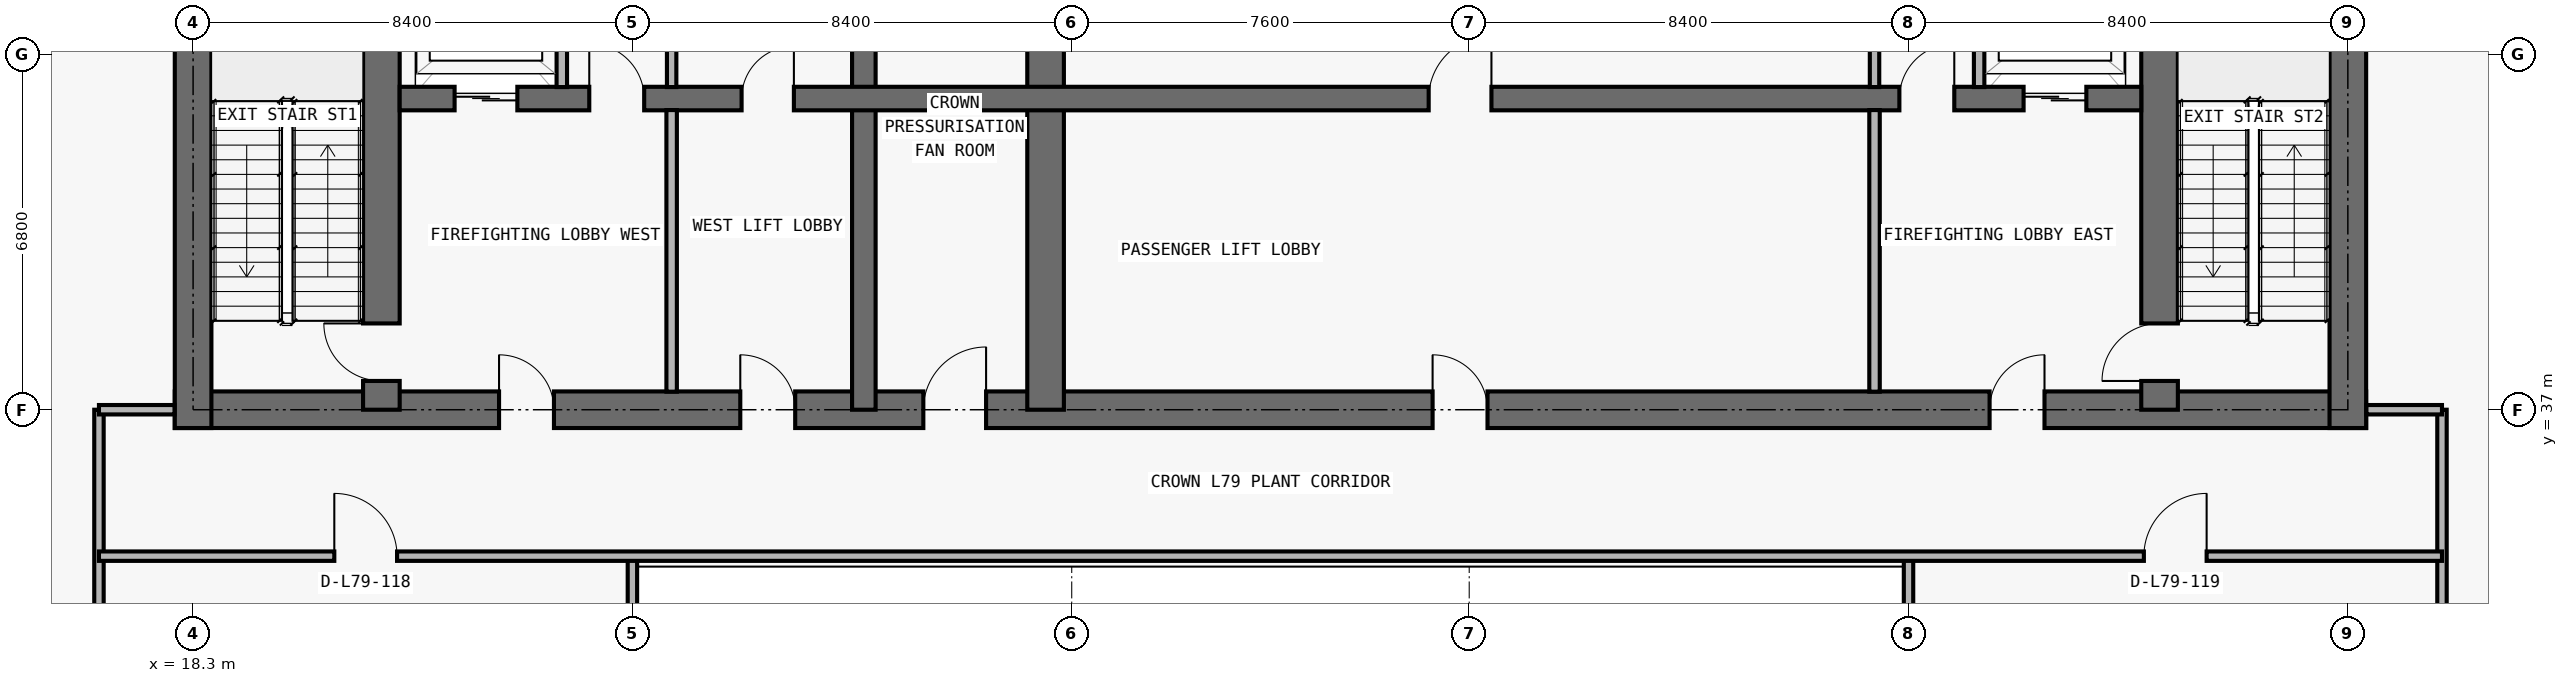
"""IFC4 building model, lengths in metres.
Left out: names, types, materials, properties, quantities, classifications, styles, units other than length and angle.
Written with IfcOpenShell. Run it as: python <this file> out.ifc"""

import sys

from ifc_helpers import new_model, si_unit, direction, frame, frame_2d, origin, place, context, subcontext, project, spatial, rectangle, extrude, element, fill, save


model = new_model("IFC4")
c1 = context("Model", 3, precision=1e-05, world=origin(), true_north=direction((0.0, 1.0)))
c2 = subcontext(c1, "Body", "Model", "MODEL_VIEW")
j1 = project(units=[si_unit("LENGTHUNIT", "METRE"), si_unit("PLANEANGLEUNIT", "RADIAN")], contexts=[c1])
p1 = place(None, origin())
s1 = spatial("IfcSite", under=j1, at=p1, CompositionType="ELEMENT")
p2 = place(p1, origin())
s2 = spatial("IfcBuilding", under=s1, at=p2, CompositionType="ELEMENT")
p3 = place(p2, frame((0.0, 0.0, 284.8)))
s3 = spatial("IfcBuildingStorey", under=s2, at=p3, CompositionType="ELEMENT", Elevation=284.8)
p4 = place(p3, frame((17.95, 37.0, 0.0), z_axis=(0.0, 0.0, 1.0), x_axis=(1.0, 0.0, 0.0)))
e1 = element("IfcWall", 1, at=p4, inside=s3, PredefinedType="SHEAR", context=c2, shape_type="SweptSolid", body=[
    extrude(rectangle(XDim=41.9, YDim=0.7, at=frame_2d((20.95, 0.0))), origin(), (0.0, 0.0, 1.0), 5.1),
])
p5 = place(p4, frame((14.312, 0.0, 0.0)))
e2 = element("IfcOpeningElement", 2, at=p5, cuts=e1, PredefinedType="OPENING", context=c2, shape_type="SweptSolid", body=[
    extrude(rectangle(XDim=1.2, YDim=2.2, at=frame_2d((0.6, 1.1))), frame((0.0, 0.36, 0.0), z_axis=(0.0, -1.0, 0.0), x_axis=(1.0, 0.0, 0.0)), (0.0, 0.0, 1.0), 0.72),
])
p6 = place(p4, frame((6.2, 0.0, 0.0)))
e3 = element("IfcOpeningElement", 3, at=p6, cuts=e1, PredefinedType="OPENING", context=c2, shape_type="SweptSolid", body=[
    extrude(rectangle(XDim=1.05, YDim=2.15, at=frame_2d((0.525, 1.075))), frame((0.0, 0.36, 0.0), z_axis=(0.0, -1.0, 0.0), x_axis=(1.0, 0.0, 0.0)), (0.0, 0.0, 1.0), 0.72),
])
p7 = place(p4, frame((34.7, 0.0, 0.0)))
e4 = element("IfcOpeningElement", 4, at=p7, cuts=e1, PredefinedType="OPENING", context=c2, shape_type="SweptSolid", body=[
    extrude(rectangle(XDim=1.05, YDim=2.15, at=frame_2d((0.525, 1.075))), frame((0.0, 0.36, 0.0), z_axis=(0.0, -1.0, 0.0), x_axis=(1.0, 0.0, 0.0)), (0.0, 0.0, 1.0), 0.72),
])
p8 = place(p4, frame((10.812, 0.0, 0.0)))
e5 = element("IfcOpeningElement", 5, at=p8, cuts=e1, PredefinedType="OPENING", context=c2, shape_type="SweptSolid", body=[
    extrude(rectangle(XDim=1.05, YDim=2.15, at=frame_2d((0.525, 1.075))), frame((0.0, 0.36, 0.0), z_axis=(0.0, -1.0, 0.0), x_axis=(1.0, 0.0, 0.0)), (0.0, 0.0, 1.0), 0.72),
])
p9 = place(p4, frame((24.05, 0.0, 0.0)))
e6 = element("IfcOpeningElement", 6, at=p9, cuts=e1, PredefinedType="OPENING", context=c2, shape_type="SweptSolid", body=[
    extrude(rectangle(XDim=1.05, YDim=2.15, at=frame_2d((0.525, 1.075))), frame((0.0, 0.36, 0.0), z_axis=(0.0, -1.0, 0.0), x_axis=(1.0, 0.0, 0.0)), (0.0, 0.0, 1.0), 0.72),
])
for number, where, z_axis, x_axis in (
    (7, (18.3, 36.65, 0.0), (0.0, 0.0, 1.0), (0.0, 1.0, 0.0)),
    (8, (59.5, 36.65, 0.0), (0.0, 0.0, 1.0), (0.0, 1.0, 0.0)),
):
    element("IfcWall", number, at=place(p3, frame(where, z_axis=z_axis, x_axis=x_axis)), inside=s3, PredefinedType="SHEAR", context=c2, shape_type="SweptSolid", body=[
        extrude(rectangle(XDim=13.95, YDim=0.7, at=frame_2d((6.975, 0.0))), origin(), (0.0, 0.0, 1.0), 5.1),
    ])
p10 = place(p3, frame((21.9, 37.0, 0.0), z_axis=(0.0, 0.0, 1.0), x_axis=(0.0, 1.0, 0.0)))
e9 = element("IfcWall", 9, at=p10, inside=s3, PredefinedType="SHEAR", context=c2, shape_type="SweptSolid", body=[
    extrude(rectangle(XDim=9.575, YDim=0.7, at=frame_2d((4.788, 0.0))), origin(), (0.0, 0.0, 1.0), 5.1),
])
p11 = place(p10, frame((0.55, 0.0, 0.0)))
e10 = element("IfcOpeningElement", 10, at=p11, cuts=e9, PredefinedType="OPENING", context=c2, shape_type="SweptSolid", body=[
    extrude(rectangle(XDim=1.1, YDim=2.15, at=frame_2d((0.55, 1.075))), frame((0.0, 0.36, 0.0), z_axis=(0.0, -1.0, 0.0), x_axis=(1.0, 0.0, 0.0)), (0.0, 0.0, 1.0), 0.72),
])
p12 = place(p3, frame((55.9, 37.0, 0.0), z_axis=(0.0, 0.0, 1.0), x_axis=(0.0, 1.0, 0.0)))
e11 = element("IfcWall", 11, at=p12, inside=s3, PredefinedType="SHEAR", context=c2, shape_type="SweptSolid", body=[
    extrude(rectangle(XDim=9.575, YDim=0.7, at=frame_2d((4.788, 0.0))), origin(), (0.0, 0.0, 1.0), 5.1),
])
p13 = place(p12, frame((0.55, 0.0, 0.0)))
e12 = element("IfcOpeningElement", 12, at=p13, cuts=e11, PredefinedType="OPENING", context=c2, shape_type="SweptSolid", body=[
    extrude(rectangle(XDim=1.1, YDim=2.15, at=frame_2d((0.55, 1.075))), frame((0.0, 0.36, 0.0), z_axis=(0.0, -1.0, 0.0), x_axis=(1.0, 0.0, 0.0)), (0.0, 0.0, 1.0), 0.72),
])
p14 = place(p3, frame((31.125, 37.0, 0.0), z_axis=(0.0, 0.0, 1.0), x_axis=(0.0, 1.0, 0.0)))
e13 = element("IfcWall", 13, at=p14, inside=s3, PredefinedType="SHEAR", context=c2, shape_type="SweptSolid", body=[
    extrude(rectangle(XDim=9.575, YDim=0.45, at=frame_2d((4.788, 0.0))), origin(), (0.0, 0.0, 1.0), 5.1),
])
p15 = place(p3, frame((34.6, 37.0, 0.0), z_axis=(0.0, 0.0, 1.0), x_axis=(0.0, 1.0, 0.0)))
e14 = element("IfcWall", 14, at=p15, inside=s3, PredefinedType="SHEAR", context=c2, shape_type="SweptSolid", body=[
    extrude(rectangle(XDim=9.575, YDim=0.7, at=frame_2d((4.788, 0.0))), origin(), (0.0, 0.0, 1.0), 5.1),
])
p16 = place(p3, frame((22.25, 42.95, 0.0), z_axis=(0.0, 0.0, 1.0), x_axis=(1.0, 0.0, 0.0)))
e15 = element("IfcWall", 15, at=p16, inside=s3, PredefinedType="SHEAR", context=c2, shape_type="SweptSolid", body=[
    extrude(rectangle(XDim=33.3, YDim=0.45, at=frame_2d((16.65, 0.0))), origin(), (0.0, 0.0, 1.0), 5.1),
])
p17 = place(p16, frame((1.05, 0.0, 0.0)))
e16 = element("IfcOpeningElement", 16, at=p17, cuts=e15, PredefinedType="OPENING", context=c2, shape_type="SweptSolid", body=[
    extrude(rectangle(XDim=1.2, YDim=2.2, at=frame_2d((0.6, 1.1))), frame((0.0, 0.235, 0.0), z_axis=(0.0, -1.0, 0.0), x_axis=(1.0, 0.0, 0.0)), (0.0, 0.0, 1.0), 0.47),
])
p18 = place(p16, frame((31.05, 0.0, 0.0)))
e17 = element("IfcOpeningElement", 17, at=p18, cuts=e15, PredefinedType="OPENING", context=c2, shape_type="SweptSolid", body=[
    extrude(rectangle(XDim=1.2, YDim=2.2, at=frame_2d((0.6, 1.1))), frame((0.0, 0.235, 0.0), z_axis=(0.0, -1.0, 0.0), x_axis=(1.0, 0.0, 0.0)), (0.0, 0.0, 1.0), 0.47),
])
p19 = place(p16, frame((3.625, 0.0, 0.0)))
e18 = element("IfcOpeningElement", 18, at=p19, cuts=e15, PredefinedType="OPENING", context=c2, shape_type="SweptSolid", body=[
    extrude(rectangle(XDim=1.05, YDim=2.15, at=frame_2d((0.525, 1.075))), frame((0.0, 0.235, 0.0), z_axis=(0.0, -1.0, 0.0), x_axis=(1.0, 0.0, 0.0)), (0.0, 0.0, 1.0), 0.47),
])
p20 = place(p16, frame((28.675, 0.0, 0.0)))
e19 = element("IfcOpeningElement", 19, at=p20, cuts=e15, PredefinedType="OPENING", context=c2, shape_type="SweptSolid", body=[
    extrude(rectangle(XDim=1.05, YDim=2.15, at=frame_2d((0.525, 1.075))), frame((0.0, 0.235, 0.0), z_axis=(0.0, -1.0, 0.0), x_axis=(1.0, 0.0, 0.0)), (0.0, 0.0, 1.0), 0.47),
])
p21 = place(p16, frame((6.538, 0.0, 0.0)))
e20 = element("IfcOpeningElement", 20, at=p21, cuts=e15, PredefinedType="OPENING", context=c2, shape_type="SweptSolid", body=[
    extrude(rectangle(XDim=1.0, YDim=2.2, at=frame_2d((0.5, 1.1))), frame((0.0, 0.235, 0.0), z_axis=(0.0, -1.0, 0.0), x_axis=(1.0, 0.0, 0.0)), (0.0, 0.0, 1.0), 0.47),
])
p22 = place(p16, frame((19.675, 0.0, 0.0)))
e21 = element("IfcOpeningElement", 21, at=p22, cuts=e15, PredefinedType="OPENING", context=c2, shape_type="SweptSolid", body=[
    extrude(rectangle(XDim=1.2, YDim=2.2, at=frame_2d((0.6, 1.1))), frame((0.0, 0.235, 0.0), z_axis=(0.0, -1.0, 0.0), x_axis=(1.0, 0.0, 0.0)), (0.0, 0.0, 1.0), 0.47),
])
p23 = place(p3, frame((16.5, 18.485, 0.0), z_axis=(0.0, 0.0, 1.0), x_axis=(0.0, 1.0, 0.0)))
e22 = element("IfcWall", 22, at=p23, inside=s3, PredefinedType="PARTITIONING", context=c2, shape_type="SweptSolid", body=[
    extrude(rectangle(XDim=18.515, YDim=0.18, at=frame_2d((9.257, 0.0))), origin(), (0.0, 0.0, 1.0), 5.1),
])
p24 = place(p3, frame((25.35, 43.17, 0.0), z_axis=(0.0, 0.0, 1.0), x_axis=(0.0, 1.0, 0.0)))
e23 = element("IfcWall", 23, at=p24, inside=s3, PredefinedType="PARTITIONING", context=c2, shape_type="SweptSolid", body=[
    extrude(rectangle(XDim=3.185, YDim=0.2, at=frame_2d((1.593, 0.0))), origin(), (0.0, 0.0, 1.0), 5.1),
])
p25 = place(p3, frame((26.7, 29.405, 0.0), z_axis=(0.0, 0.0, 1.0), x_axis=(0.0, 1.0, 0.0)))
e24 = element("IfcWall", 24, at=p25, inside=s3, PredefinedType="PARTITIONING", context=c2, shape_type="SweptSolid", body=[
    extrude(rectangle(XDim=4.795, YDim=0.18, at=frame_2d((2.397, 0.0))), origin(), (0.0, 0.0, 1.0), 4.385),
])
p26 = place(p3, frame((27.45, 37.345, 0.0), z_axis=(0.0, 0.0, 1.0), x_axis=(0.0, 1.0, 0.0)))
e25 = element("IfcWall", 25, at=p26, inside=s3, PredefinedType="PARTITIONING", context=c2, shape_type="SweptSolid", body=[
    extrude(rectangle(XDim=5.385, YDim=0.2, at=frame_2d((2.692, 0.0))), origin(), (0.0, 0.0, 1.0), 5.1),
])
p27 = place(p3, frame((27.45, 43.17, 0.0), z_axis=(0.0, 0.0, 1.0), x_axis=(0.0, 1.0, 0.0)))
e26 = element("IfcWall", 26, at=p27, inside=s3, PredefinedType="PARTITIONING", context=c2, shape_type="SweptSolid", body=[
    extrude(rectangle(XDim=3.185, YDim=0.18, at=frame_2d((1.593, 0.0))), origin(), (0.0, 0.0, 1.0), 5.1),
])
p28 = place(p3, frame((50.45, 37.345, 0.0), z_axis=(0.0, 0.0, 1.0), x_axis=(0.0, 1.0, 0.0)))
e27 = element("IfcWall", 27, at=p28, inside=s3, PredefinedType="PARTITIONING", context=c2, shape_type="SweptSolid", body=[
    extrude(rectangle(XDim=5.385, YDim=0.2, at=frame_2d((2.692, 0.0))), origin(), (0.0, 0.0, 1.0), 5.1),
])
p29 = place(p3, frame((50.45, 43.17, 0.0), z_axis=(0.0, 0.0, 1.0), x_axis=(0.0, 1.0, 0.0)))
e28 = element("IfcWall", 28, at=p29, inside=s3, PredefinedType="PARTITIONING", context=c2, shape_type="SweptSolid", body=[
    extrude(rectangle(XDim=3.185, YDim=0.18, at=frame_2d((1.593, 0.0))), origin(), (0.0, 0.0, 1.0), 5.1),
])
p30 = place(p3, frame((51.1, 29.405, 0.0), z_axis=(0.0, 0.0, 1.0), x_axis=(0.0, 1.0, 0.0)))
e29 = element("IfcWall", 29, at=p30, inside=s3, PredefinedType="PARTITIONING", context=c2, shape_type="SweptSolid", body=[
    extrude(rectangle(XDim=4.795, YDim=0.18, at=frame_2d((2.397, 0.0))), origin(), (0.0, 0.0, 1.0), 4.385),
])
p31 = place(p3, frame((52.45, 43.17, 0.0), z_axis=(0.0, 0.0, 1.0), x_axis=(0.0, 1.0, 0.0)))
e30 = element("IfcWall", 30, at=p31, inside=s3, PredefinedType="PARTITIONING", context=c2, shape_type="SweptSolid", body=[
    extrude(rectangle(XDim=3.185, YDim=0.2, at=frame_2d((1.593, 0.0))), origin(), (0.0, 0.0, 1.0), 5.1),
])
p32 = place(p3, frame((61.3, 18.52, 0.0), z_axis=(0.0, 0.0, 1.0), x_axis=(0.0, 1.0, 0.0)))
e31 = element("IfcWall", 31, at=p32, inside=s3, PredefinedType="PARTITIONING", context=c2, shape_type="SweptSolid", body=[
    extrude(rectangle(XDim=18.48, YDim=0.18, at=frame_2d((9.24, 0.0))), origin(), (0.0, 0.0, 1.0), 5.1),
])
p33 = place(p3, frame((16.5, 34.2, 0.0), z_axis=(0.0, 0.0, 1.0), x_axis=(1.0, 0.0, 0.0)))
e32 = element("IfcWall", 32, at=p33, inside=s3, PredefinedType="PARTITIONING", context=c2, shape_type="SweptSolid", body=[
    extrude(rectangle(XDim=44.8, YDim=0.18, at=frame_2d((22.4, 0.0))), origin(), (0.0, 0.0, 1.0), 5.1),
])
p34 = place(p33, frame((4.5, 0.0, 0.0)))
e33 = element("IfcOpeningElement", 33, at=p34, cuts=e32, PredefinedType="OPENING", context=c2, shape_type="SweptSolid", body=[
    extrude(rectangle(XDim=1.2, YDim=2.2, at=frame_2d((0.6, 1.1))), frame((0.0, 0.1, 0.0), z_axis=(0.0, -1.0, 0.0), x_axis=(1.0, 0.0, 0.0)), (0.0, 0.0, 1.0), 0.2),
])
p35 = place(p33, frame((39.1, 0.0, 0.0)))
e34 = element("IfcOpeningElement", 34, at=p35, cuts=e32, PredefinedType="OPENING", context=c2, shape_type="SweptSolid", body=[
    extrude(rectangle(XDim=1.2, YDim=2.2, at=frame_2d((0.6, 1.1))), frame((0.0, 0.1, 0.0), z_axis=(0.0, -1.0, 0.0), x_axis=(1.0, 0.0, 0.0)), (0.0, 0.0, 1.0), 0.2),
])
for number, where, z_axis, x_axis in (
    (35, (16.5, 37.0, 0.0), (0.0, 0.0, 1.0), (1.0, 0.0, 0.0)),
    (36, (59.855, 37.0, 0.0), (0.0, 0.0, 1.0), (1.0, 0.0, 0.0)),
):
    element("IfcWall", number, at=place(p3, frame(where, z_axis=z_axis, x_axis=x_axis)), inside=s3, PredefinedType="PARTITIONING", context=c2, shape_type="SweptSolid", body=[
        extrude(rectangle(XDim=1.445, YDim=0.18, at=frame_2d((0.723, 0.0))), origin(), (0.0, 0.0, 1.0), 5.1),
    ])
p36 = place(p17, origin())
e37 = element("IfcDoor", 37, at=p36, inside=s3, OperationType="DOUBLE_DOOR_SLIDING", PredefinedType="DOOR", context=c2, shape_type="SweptSolid", body=[
    extrude(rectangle(XDim=1.2, YDim=2.2, at=frame_2d((0.6, 1.1))), frame((0.0, 0.025, 0.0), z_axis=(0.0, -1.0, 0.0), x_axis=(1.0, 0.0, 0.0)), (0.0, 0.0, 1.0), 0.05),
])
fill(e16, e37)
p37 = place(p18, origin())
e38 = element("IfcDoor", 38, at=p37, inside=s3, OperationType="DOUBLE_DOOR_SLIDING", PredefinedType="DOOR", context=c2, shape_type="SweptSolid", body=[
    extrude(rectangle(XDim=1.2, YDim=2.2, at=frame_2d((0.6, 1.1))), frame((0.0, 0.025, 0.0), z_axis=(0.0, -1.0, 0.0), x_axis=(1.0, 0.0, 0.0)), (0.0, 0.0, 1.0), 0.05),
])
fill(e17, e38)
p38 = place(p5, origin())
e39 = element("IfcDoor", 39, at=p38, inside=s3, OperationType="SINGLE_SWING_RIGHT", PredefinedType="DOOR", context=c2, shape_type="SweptSolid", body=[
    extrude(rectangle(XDim=1.2, YDim=2.2, at=frame_2d((0.6, 1.1))), frame((0.0, 0.025, 0.0), z_axis=(0.0, -1.0, 0.0), x_axis=(1.0, 0.0, 0.0)), (0.0, 0.0, 1.0), 0.05),
])
fill(e2, e39)
p39 = place(p6, origin())
e40 = element("IfcDoor", 40, at=p39, inside=s3, OperationType="SINGLE_SWING_LEFT", PredefinedType="DOOR", context=c2, shape_type="SweptSolid", body=[
    extrude(rectangle(XDim=1.05, YDim=2.15, at=frame_2d((0.525, 1.075))), frame((0.0, 0.025, 0.0), z_axis=(0.0, -1.0, 0.0), x_axis=(1.0, 0.0, 0.0)), (0.0, 0.0, 1.0), 0.05),
])
fill(e3, e40)
p40 = place(p11, origin())
e41 = element("IfcDoor", 41, at=p40, inside=s3, OperationType="SINGLE_SWING_RIGHT", PredefinedType="DOOR", context=c2, shape_type="SweptSolid", body=[
    extrude(rectangle(XDim=1.1, YDim=2.15, at=frame_2d((0.55, 1.075))), frame((0.0, 0.025, 0.0), z_axis=(0.0, -1.0, 0.0), x_axis=(1.0, 0.0, 0.0)), (0.0, 0.0, 1.0), 0.05),
])
fill(e10, e41)
p41 = place(p19, origin())
e42 = element("IfcDoor", 42, at=p41, inside=s3, OperationType="SINGLE_SWING_LEFT", PredefinedType="DOOR", context=c2, shape_type="SweptSolid", body=[
    extrude(rectangle(XDim=1.05, YDim=2.15, at=frame_2d((0.525, 1.075))), frame((0.0, 0.025, 0.0), z_axis=(0.0, -1.0, 0.0), x_axis=(1.0, 0.0, 0.0)), (0.0, 0.0, 1.0), 0.05),
])
fill(e18, e42)
p42 = place(p7, origin())
e43 = element("IfcDoor", 43, at=p42, inside=s3, OperationType="SINGLE_SWING_RIGHT", PredefinedType="DOOR", context=c2, shape_type="SweptSolid", body=[
    extrude(rectangle(XDim=1.05, YDim=2.15, at=frame_2d((0.525, 1.075))), frame((0.0, 0.025, 0.0), z_axis=(0.0, -1.0, 0.0), x_axis=(1.0, 0.0, 0.0)), (0.0, 0.0, 1.0), 0.05),
])
fill(e4, e43)
p43 = place(p13, origin())
e44 = element("IfcDoor", 44, at=p43, inside=s3, OperationType="SINGLE_SWING_LEFT", PredefinedType="DOOR", context=c2, shape_type="SweptSolid", body=[
    extrude(rectangle(XDim=1.1, YDim=2.15, at=frame_2d((0.55, 1.075))), frame((0.0, 0.025, 0.0), z_axis=(0.0, -1.0, 0.0), x_axis=(1.0, 0.0, 0.0)), (0.0, 0.0, 1.0), 0.05),
])
fill(e12, e44)
p44 = place(p20, origin())
e45 = element("IfcDoor", 45, at=p44, inside=s3, OperationType="SINGLE_SWING_RIGHT", PredefinedType="DOOR", context=c2, shape_type="SweptSolid", body=[
    extrude(rectangle(XDim=1.05, YDim=2.15, at=frame_2d((0.525, 1.075))), frame((0.0, 0.025, 0.0), z_axis=(0.0, -1.0, 0.0), x_axis=(1.0, 0.0, 0.0)), (0.0, 0.0, 1.0), 0.05),
])
fill(e19, e45)
p45 = place(p8, origin())
e46 = element("IfcDoor", 46, at=p45, inside=s3, OperationType="SINGLE_SWING_LEFT", PredefinedType="DOOR", context=c2, shape_type="SweptSolid", body=[
    extrude(rectangle(XDim=1.05, YDim=2.15, at=frame_2d((0.525, 1.075))), frame((0.0, 0.025, 0.0), z_axis=(0.0, -1.0, 0.0), x_axis=(1.0, 0.0, 0.0)), (0.0, 0.0, 1.0), 0.05),
])
fill(e5, e46)
p46 = place(p21, origin())
e47 = element("IfcDoor", 47, at=p46, inside=s3, OperationType="SINGLE_SWING_RIGHT", PredefinedType="DOOR", context=c2, shape_type="SweptSolid", body=[
    extrude(rectangle(XDim=1.0, YDim=2.2, at=frame_2d((0.5, 1.1))), frame((0.0, 0.025, 0.0), z_axis=(0.0, -1.0, 0.0), x_axis=(1.0, 0.0, 0.0)), (0.0, 0.0, 1.0), 0.05),
])
fill(e20, e47)
p47 = place(p9, origin())
e48 = element("IfcDoor", 48, at=p47, inside=s3, OperationType="SINGLE_SWING_LEFT", PredefinedType="DOOR", context=c2, shape_type="SweptSolid", body=[
    extrude(rectangle(XDim=1.05, YDim=2.15, at=frame_2d((0.525, 1.075))), frame((0.0, 0.025, 0.0), z_axis=(0.0, -1.0, 0.0), x_axis=(1.0, 0.0, 0.0)), (0.0, 0.0, 1.0), 0.05),
])
fill(e6, e48)
p48 = place(p22, origin())
e49 = element("IfcDoor", 49, at=p48, inside=s3, OperationType="SINGLE_SWING_RIGHT", PredefinedType="DOOR", context=c2, shape_type="SweptSolid", body=[
    extrude(rectangle(XDim=1.2, YDim=2.2, at=frame_2d((0.6, 1.1))), frame((0.0, 0.025, 0.0), z_axis=(0.0, -1.0, 0.0), x_axis=(1.0, 0.0, 0.0)), (0.0, 0.0, 1.0), 0.05),
])
fill(e21, e49)
p49 = place(p34, origin())
e50 = element("IfcDoor", 50, at=p49, inside=s3, OperationType="SINGLE_SWING_LEFT", PredefinedType="DOOR", context=c2, shape_type="SweptSolid", body=[
    extrude(rectangle(XDim=1.2, YDim=2.2, at=frame_2d((0.6, 1.1))), frame((0.0, 0.025, 0.0), z_axis=(0.0, -1.0, 0.0), x_axis=(1.0, 0.0, 0.0)), (0.0, 0.0, 1.0), 0.05),
])
fill(e33, e50)
p50 = place(p35, origin())
e51 = element("IfcDoor", 51, at=p50, inside=s3, OperationType="SINGLE_SWING_RIGHT", PredefinedType="DOOR", context=c2, shape_type="SweptSolid", body=[
    extrude(rectangle(XDim=1.2, YDim=2.2, at=frame_2d((0.6, 1.1))), frame((0.0, 0.025, 0.0), z_axis=(0.0, -1.0, 0.0), x_axis=(1.0, 0.0, 0.0)), (0.0, 0.0, 1.0), 0.05),
])
fill(e34, e51)
save(model, sys.argv[1])
